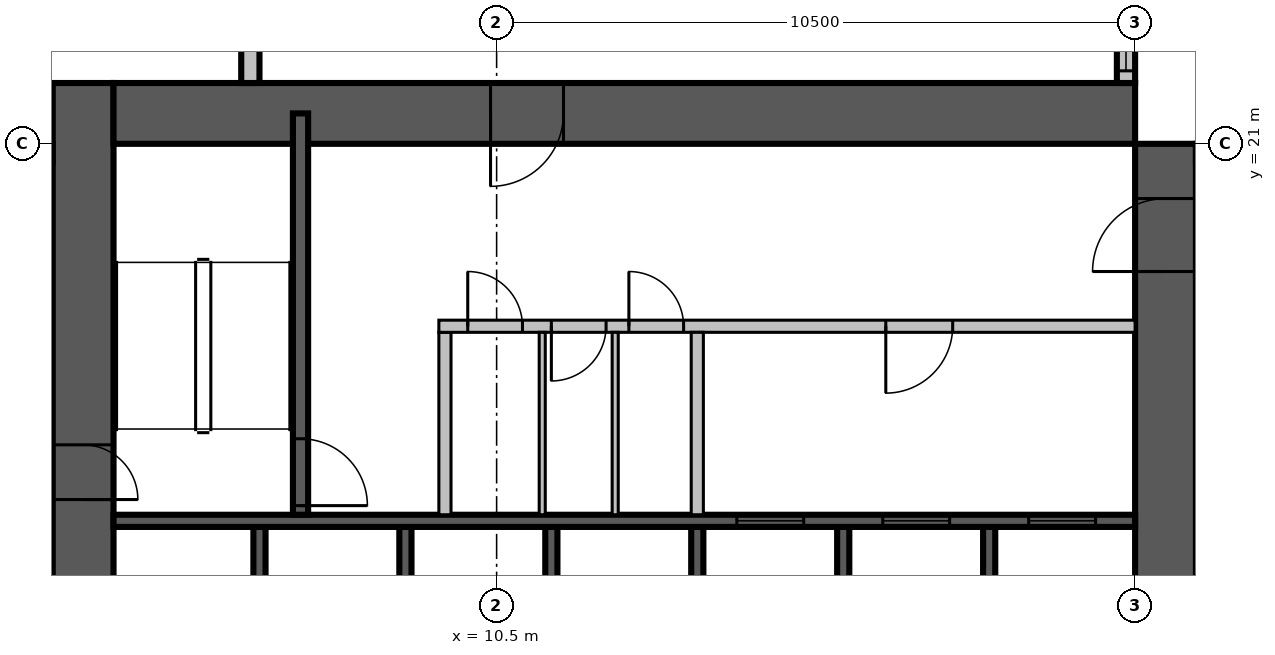
"""IFC4 building model, lengths in metres.
Left out: names, types, materials, properties, quantities, classifications, styles, units other than length and angle.
Written with IfcOpenShell. Run it as: python <this file> out.ifc"""

import sys

from ifc_helpers import new_model, si_unit, direction, frame, frame_2d, origin, place, context, subcontext, project, spatial, rectangle, extrude, source, transform, mapped, element, fill, save


model = new_model("IFC4")
c1 = context("Model", 3, precision=1e-05, world=origin(), true_north=direction((0.0, 1.0)))
c2 = subcontext(c1, "Body", "Model", "MODEL_VIEW")
j1 = project(units=[si_unit("LENGTHUNIT", "METRE"), si_unit("PLANEANGLEUNIT", "RADIAN")], contexts=[c1])
p1 = place(None, origin())
s1 = spatial("IfcSite", under=j1, at=p1, CompositionType="ELEMENT")
p2 = place(p1, origin())
s2 = spatial("IfcBuilding", under=s1, at=p2, CompositionType="ELEMENT")
p3 = place(p2, frame((0.0, 0.0, 137.1)))
s3 = spatial("IfcBuildingStorey", under=s2, at=p3, CompositionType="ELEMENT", Elevation=137.1)
m1 = source(origin(), c2, "Body", "SweptSolid", [
    extrude(rectangle(XDim=17.8, YDim=1.0, at=frame_2d((8.9, 0.0))), origin(), (0.0, 0.0, 1.0), 4.2),
])
p4 = place(p3, frame((3.7, 4.2, 0.0), z_axis=(0.0, 0.0, 1.0), x_axis=(0.0, 1.0, 0.0)))
e1 = element("IfcWall", 1, at=p4, inside=s3, PredefinedType="SHEAR", context=c2, shape_type="MappedRepresentation", body=[
    mapped(m1, transform((0.0, 0.0, 0.0), scale=1.0)),
])
m2 = source(origin(), c2, "Body", "SweptSolid", [
    extrude(rectangle(XDim=2.2, YDim=2.1, at=frame_2d((1.1, 1.05))), frame((0.0, 0.51, 0.0), z_axis=(0.0, -1.0, 0.0), x_axis=(1.0, 0.0, 0.0)), (0.0, 0.0, 1.0), 1.02),
])
p5 = place(p4, frame((4.2, 0.0, 0.0)))
e2 = element("IfcOpeningElement", 2, at=p5, cuts=e1, PredefinedType="OPENING", context=c2, shape_type="MappedRepresentation", body=[
    mapped(m2, transform((0.0, 0.0, 0.0), scale=1.0)),
])
m3 = source(origin(), c2, "Body", "SweptSolid", [
    extrude(rectangle(XDim=0.9, YDim=2.1, at=frame_2d((0.45, 1.05))), frame((0.0, 0.51, 0.0), z_axis=(0.0, -1.0, 0.0), x_axis=(1.0, 0.0, 0.0)), (0.0, 0.0, 1.0), 1.02),
])
p6 = place(p4, frame((10.95, 0.0, 0.0)))
e3 = element("IfcOpeningElement", 3, at=p6, cuts=e1, PredefinedType="OPENING", context=c2, shape_type="MappedRepresentation", body=[
    mapped(m3, transform((0.0, 0.0, 0.0), scale=1.0)),
])
m4 = source(origin(), c2, "Body", "SweptSolid", [
    extrude(rectangle(XDim=16.8, YDim=1.0, at=frame_2d((8.4, 0.0))), origin(), (0.0, 0.0, 1.0), 4.2),
])
p7 = place(p3, frame((21.5, 4.2, 0.0), z_axis=(0.0, 0.0, 1.0), x_axis=(0.0, 1.0, 0.0)))
e4 = element("IfcWall", 4, at=p7, inside=s3, PredefinedType="SHEAR", context=c2, shape_type="MappedRepresentation", body=[
    mapped(m4, transform((0.0, 0.0, 0.0), scale=1.0)),
])
p8 = place(p7, frame((4.2, 0.0, 0.0)))
e5 = element("IfcOpeningElement", 5, at=p8, cuts=e4, PredefinedType="OPENING", context=c2, shape_type="MappedRepresentation", body=[
    mapped(m2, transform((0.0, 0.0, 0.0), scale=1.0)),
])
m5 = source(origin(), c2, "Body", "SweptSolid", [
    extrude(rectangle(XDim=1.2, YDim=2.1, at=frame_2d((0.6, 1.05))), frame((0.0, 0.51, 0.0), z_axis=(0.0, -1.0, 0.0), x_axis=(1.0, 0.0, 0.0)), (0.0, 0.0, 1.0), 1.02),
])
p9 = place(p7, frame((14.7, 0.0, 0.0)))
e6 = element("IfcOpeningElement", 6, at=p9, cuts=e4, PredefinedType="OPENING", context=c2, shape_type="MappedRepresentation", body=[
    mapped(m5, transform((0.0, 0.0, 0.0), scale=1.0)),
])
p10 = place(p3, frame((4.2, 21.5, 0.0), z_axis=(0.0, 0.0, 1.0), x_axis=(1.0, 0.0, 0.0)))
e7 = element("IfcWall", 7, at=p10, inside=s3, PredefinedType="SHEAR", context=c2, shape_type="MappedRepresentation", body=[
    mapped(m4, transform((0.0, 0.0, 0.0), scale=1.0)),
])
p11 = place(p10, frame((6.2, 0.0, 0.0)))
e8 = element("IfcOpeningElement", 8, at=p11, cuts=e7, PredefinedType="OPENING", context=c2, shape_type="MappedRepresentation", body=[
    mapped(m5, transform((0.0, 0.0, 0.0), scale=1.0)),
])
m6 = source(origin(), c2, "Body", "SweptSolid", [
    extrude(rectangle(XDim=6.875, YDim=0.3, at=frame_2d((3.438, 0.0))), origin(), (0.0, 0.0, 1.0), 3.8),
])
p12 = place(p3, frame((20.85, 22.0, 0.0), z_axis=(0.0, 0.0, 1.0), x_axis=(0.0, 1.0, 0.0)))
e9 = element("IfcWall", 9, at=p12, inside=s3, PredefinedType="STANDARD", context=c2, shape_type="MappedRepresentation", body=[
    mapped(m6, transform((0.0, 0.0, 0.0), scale=1.0)),
])
m7 = source(origin(), c2, "Body", "SweptSolid", [
    extrude(rectangle(XDim=1.8, YDim=2.7, at=frame_2d((0.9, 1.35))), frame((0.0, 0.16, 0.0), z_axis=(0.0, -1.0, 0.0), x_axis=(1.0, 0.0, 0.0)), (0.0, 0.0, 1.0), 0.32),
])
p13 = place(p12, frame((0.2, 0.0, 0.6)))
e10 = element("IfcOpeningElement", 10, at=p13, cuts=e9, PredefinedType="OPENING", context=c2, shape_type="MappedRepresentation", body=[
    mapped(m7, transform((0.0, 0.0, 0.0), scale=1.0)),
])
p14 = place(p12, frame((4.537, 0.0, 0.6)))
e11 = element("IfcOpeningElement", 11, at=p14, cuts=e9, PredefinedType="OPENING", context=c2, shape_type="MappedRepresentation", body=[
    mapped(m7, transform((0.0, 0.0, 0.0), scale=1.0)),
])
m8 = source(origin(), c2, "Body", "SweptSolid", [
    extrude(rectangle(XDim=16.4, YDim=0.3, at=frame_2d((8.2, 0.0))), origin(), (0.0, 0.0, 1.0), 3.8),
])
p15 = place(p3, frame((6.45, 38.4, 0.0), z_axis=(0.0, 0.0, 1.0), x_axis=(0.0, -1.0, 0.0)))
e12 = element("IfcWall", 12, at=p15, inside=s3, PredefinedType="STANDARD", context=c2, shape_type="MappedRepresentation", body=[
    mapped(m8, transform((0.0, 0.0, 0.0), scale=1.0)),
])
p16 = place(p15, frame((1.15, 0.0, 0.6)))
e13 = element("IfcOpeningElement", 13, at=p16, cuts=e12, PredefinedType="OPENING", context=c2, shape_type="MappedRepresentation", body=[
    mapped(m7, transform((0.0, 0.0, 0.0), scale=1.0)),
])
p17 = place(p15, frame((9.438, 0.0, 0.6)))
e14 = element("IfcOpeningElement", 14, at=p17, cuts=e12, PredefinedType="OPENING", context=c2, shape_type="MappedRepresentation", body=[
    mapped(m7, transform((0.0, 0.0, 0.0), scale=1.0)),
])
m9 = source(origin(), c2, "Body", "SweptSolid", [
    extrude(rectangle(XDim=3.0, YDim=2.7, at=frame_2d((1.5, 1.35))), frame((0.0, 0.16, 0.0), z_axis=(0.0, -1.0, 0.0), x_axis=(1.0, 0.0, 0.0)), (0.0, 0.0, 1.0), 0.32),
])
p18 = place(p15, frame((12.7, 0.0, 0.6)))
e15 = element("IfcOpeningElement", 15, at=p18, cuts=e12, PredefinedType="OPENING", context=c2, shape_type="MappedRepresentation", body=[
    mapped(m9, transform((0.0, 0.0, 0.0), scale=1.0)),
])
m10 = source(origin(), c2, "Body", "SweptSolid", [
    extrude(rectangle(XDim=1.0, YDim=2.1, at=frame_2d((0.5, 1.05))), frame((0.0, 0.16, 0.0), z_axis=(0.0, -1.0, 0.0), x_axis=(1.0, 0.0, 0.0)), (0.0, 0.0, 1.0), 0.32),
])
p19 = place(p15, frame((5.45, 0.0, 0.0)))
e16 = element("IfcOpeningElement", 16, at=p19, cuts=e12, PredefinedType="OPENING", context=c2, shape_type="MappedRepresentation", body=[
    mapped(m10, transform((0.0, 0.0, 0.0), scale=1.0)),
])
m11 = source(origin(), c2, "Body", "SweptSolid", [
    extrude(rectangle(XDim=3.0, YDim=0.2, at=frame_2d((1.5, 0.0))), origin(), (0.0, 0.0, 1.0), 4.2),
])
for number, where, z_axis, x_axis in (
    (17, (6.6, 11.7, 0.0), (0.0, 0.0, 1.0), (0.0, 1.0, 0.0)),
    (18, (9.0, 11.7, 0.0), (0.0, 0.0, 1.0), (0.0, 1.0, 0.0)),
    (19, (11.4, 11.7, 0.0), (0.0, 0.0, 1.0), (0.0, 1.0, 0.0)),
    (20, (13.8, 11.7, 0.0), (0.0, 0.0, 1.0), (0.0, 1.0, 0.0)),
    (21, (16.2, 11.7, 0.0), (0.0, 0.0, 1.0), (0.0, 1.0, 0.0)),
    (22, (18.6, 11.7, 0.0), (0.0, 0.0, 1.0), (0.0, 1.0, 0.0)),
):
    element("IfcWall", number, at=place(p3, frame(where, z_axis=z_axis, x_axis=x_axis)), inside=s3, PredefinedType="SOLIDWALL", context=c2, shape_type="MappedRepresentation", body=[
        mapped(m11, transform((0.0, 0.0, 0.0), scale=1.0)),
    ])
m12 = source(origin(), c2, "Body", "SweptSolid", [
    extrude(rectangle(XDim=16.8, YDim=0.2, at=frame_2d((8.4, 0.0))), origin(), (0.0, 0.0, 1.0), 4.2),
])
p20 = place(p3, frame((4.2, 14.8, 0.0), z_axis=(0.0, 0.0, 1.0), x_axis=(1.0, 0.0, 0.0)))
e23 = element("IfcWall", 23, at=p20, inside=s3, PredefinedType="SOLIDWALL", context=c2, shape_type="MappedRepresentation", body=[
    mapped(m12, transform((0.0, 0.0, 0.0), scale=1.0)),
])
m13 = source(origin(), c2, "Body", "SweptSolid", [
    extrude(rectangle(XDim=1.1, YDim=2.1, at=frame_2d((0.55, 1.05))), frame((0.0, 0.11, 0.0), z_axis=(0.0, -1.0, 0.0), x_axis=(1.0, 0.0, 0.0)), (0.0, 0.0, 1.0), 0.22),
])
p21 = place(p20, frame((10.25, 0.0, 0.0)))
e24 = element("IfcOpeningElement", 24, at=p21, cuts=e23, PredefinedType="OPENING", context=c2, shape_type="MappedRepresentation", body=[
    mapped(m13, transform((0.0, 0.0, 0.0), scale=1.0)),
])
p22 = place(p20, frame((12.65, 0.0, 0.0)))
e25 = element("IfcOpeningElement", 25, at=p22, cuts=e23, PredefinedType="OPENING", context=c2, shape_type="MappedRepresentation", body=[
    mapped(m13, transform((0.0, 0.0, 0.0), scale=1.0)),
])
p23 = place(p20, frame((15.05, 0.0, 0.0)))
e26 = element("IfcOpeningElement", 26, at=p23, cuts=e23, PredefinedType="OPENING", context=c2, shape_type="MappedRepresentation", body=[
    mapped(m13, transform((0.0, 0.0, 0.0), scale=1.0)),
])
m14 = source(origin(), c2, "Body", "SweptSolid", [
    extrude(rectangle(XDim=6.6, YDim=0.25, at=frame_2d((3.3, 0.0))), origin(), (0.0, 0.0, 1.0), 3.8),
])
p24 = place(p3, frame((7.275, 14.9, 0.0), z_axis=(0.0, 0.0, 1.0), x_axis=(0.0, 1.0, 0.0)))
e27 = element("IfcWall", 27, at=p24, inside=s3, PredefinedType="SOLIDWALL", context=c2, shape_type="MappedRepresentation", body=[
    mapped(m14, transform((0.0, 0.0, 0.0), scale=1.0)),
])
m15 = source(origin(), c2, "Body", "SweptSolid", [
    extrude(rectangle(XDim=1.1, YDim=2.1, at=frame_2d((0.55, 1.05))), frame((0.0, 0.135, 0.0), z_axis=(0.0, -1.0, 0.0), x_axis=(1.0, 0.0, 0.0)), (0.0, 0.0, 1.0), 0.27),
])
p25 = place(p24, frame((0.15, 0.0, 0.0)))
e28 = element("IfcOpeningElement", 28, at=p25, cuts=e27, PredefinedType="OPENING", context=c2, shape_type="MappedRepresentation", body=[
    mapped(m15, transform((0.0, 0.0, 0.0), scale=1.0)),
])
m16 = source(origin(), c2, "Body", "SweptSolid", [
    extrude(rectangle(XDim=3.0, YDim=0.2, at=frame_2d((1.5, 0.0))), origin(), (0.0, 0.0, 1.0), 3.8),
])
p26 = place(p3, frame((9.65, 14.9, 0.0), z_axis=(0.0, 0.0, 1.0), x_axis=(0.0, 1.0, 0.0)))
e29 = element("IfcWall", 29, at=p26, inside=s3, PredefinedType="PARTITIONING", context=c2, shape_type="MappedRepresentation", body=[
    mapped(m16, transform((0.0, 0.0, 0.0), scale=1.0)),
])
m17 = source(origin(), c2, "Body", "SweptSolid", [
    extrude(rectangle(XDim=11.45, YDim=0.2, at=frame_2d((5.725, 0.0))), origin(), (0.0, 0.0, 1.0), 3.8),
])
p27 = place(p3, frame((9.55, 18.0, 0.0), z_axis=(0.0, 0.0, 1.0), x_axis=(1.0, 0.0, 0.0)))
e30 = element("IfcWall", 30, at=p27, inside=s3, PredefinedType="PARTITIONING", context=c2, shape_type="MappedRepresentation", body=[
    mapped(m17, transform((0.0, 0.0, 0.0), scale=1.0)),
])
m18 = source(origin(), c2, "Body", "SweptSolid", [
    extrude(rectangle(XDim=0.9, YDim=2.1, at=frame_2d((0.45, 1.05))), frame((0.0, 0.11, 0.0), z_axis=(0.0, -1.0, 0.0), x_axis=(1.0, 0.0, 0.0)), (0.0, 0.0, 1.0), 0.22),
])
p28 = place(p27, frame((0.475, 0.0, 0.0)))
e31 = element("IfcOpeningElement", 31, at=p28, cuts=e30, PredefinedType="OPENING", context=c2, shape_type="MappedRepresentation", body=[
    mapped(m18, transform((0.0, 0.0, 0.0), scale=1.0)),
])
p29 = place(p27, frame((1.85, 0.0, 0.0)))
e32 = element("IfcOpeningElement", 32, at=p29, cuts=e30, PredefinedType="OPENING", context=c2, shape_type="MappedRepresentation", body=[
    mapped(m18, transform((0.0, 0.0, 0.0), scale=1.0)),
])
p30 = place(p27, frame((3.125, 0.0, 0.0)))
e33 = element("IfcOpeningElement", 33, at=p30, cuts=e30, PredefinedType="OPENING", context=c2, shape_type="MappedRepresentation", body=[
    mapped(m18, transform((0.0, 0.0, 0.0), scale=1.0)),
])
p31 = place(p27, frame((7.35, 0.0, 0.0)))
e34 = element("IfcOpeningElement", 34, at=p31, cuts=e30, PredefinedType="OPENING", context=c2, shape_type="MappedRepresentation", body=[
    mapped(m13, transform((0.0, 0.0, 0.0), scale=1.0)),
])
p32 = place(p3, frame((13.8, 14.9, 0.0), z_axis=(0.0, 0.0, 1.0), x_axis=(0.0, 1.0, 0.0)))
e35 = element("IfcWall", 35, at=p32, inside=s3, PredefinedType="PARTITIONING", context=c2, shape_type="MappedRepresentation", body=[
    mapped(m16, transform((0.0, 0.0, 0.0), scale=1.0)),
])
m19 = source(origin(), c2, "Body", "SweptSolid", [
    extrude(rectangle(XDim=3.0, YDim=0.1, at=frame_2d((1.5, 0.0))), origin(), (0.0, 0.0, 1.0), 3.8),
])
for number, where, z_axis, x_axis in (
    (36, (11.25, 14.9, 0.0), (0.0, 0.0, 1.0), (0.0, 1.0, 0.0)),
    (37, (12.45, 14.9, 0.0), (0.0, 0.0, 1.0), (0.0, 1.0, 0.0)),
):
    element("IfcWall", number, at=place(p3, frame(where, z_axis=z_axis, x_axis=x_axis)), inside=s3, PredefinedType="PARTITIONING", context=c2, shape_type="MappedRepresentation", body=[
        mapped(m19, transform((0.0, 0.0, 0.0), scale=1.0)),
    ])
m20 = source(origin(), c2, "Body", "SweptSolid", [
    extrude(rectangle(XDim=1.8, YDim=2.7, at=frame_2d((0.9, 1.35))), frame((0.0, 0.03, 0.0), z_axis=(0.0, -1.0, 0.0), x_axis=(1.0, 0.0, 0.0)), (0.0, 0.0, 1.0), 0.06),
])
p33 = place(p13, origin())
e38 = element("IfcWindow", 38, at=p33, inside=s3, PartitioningType="SINGLE_PANEL", PredefinedType="WINDOW", context=c2, shape_type="MappedRepresentation", body=[
    mapped(m20, transform((0.0, 0.0, 0.0), scale=1.0)),
])
fill(e10, e38)
m21 = source(origin(), c2, "Body", "SweptSolid", [
    extrude(rectangle(XDim=1.1, YDim=2.1, at=frame_2d((0.55, 1.05))), frame((0.0, 0.025, 0.0), z_axis=(0.0, -1.0, 0.0), x_axis=(1.0, 0.0, 0.0)), (0.0, 0.0, 1.0), 0.05),
])
p34 = place(p21, origin())
e39 = element("IfcDoor", 39, at=p34, inside=s3, OperationType="SLIDING_TO_LEFT", PredefinedType="DOOR", context=c2, shape_type="MappedRepresentation", body=[
    mapped(m21, transform((0.0, 0.0, 0.0), scale=1.0)),
])
fill(e24, e39)
p35 = place(p22, origin())
e40 = element("IfcDoor", 40, at=p35, inside=s3, OperationType="SLIDING_TO_LEFT", PredefinedType="DOOR", context=c2, shape_type="MappedRepresentation", body=[
    mapped(m21, transform((0.0, 0.0, 0.0), scale=1.0)),
])
fill(e25, e40)
p36 = place(p23, origin())
e41 = element("IfcDoor", 41, at=p36, inside=s3, OperationType="SLIDING_TO_LEFT", PredefinedType="DOOR", context=c2, shape_type="MappedRepresentation", body=[
    mapped(m21, transform((0.0, 0.0, 0.0), scale=1.0)),
])
fill(e26, e41)
p37 = place(p25, origin())
e42 = element("IfcDoor", 42, at=p37, inside=s3, OperationType="SINGLE_SWING_RIGHT", PredefinedType="DOOR", context=c2, shape_type="MappedRepresentation", body=[
    mapped(m21, transform((0.0, 0.0, 0.0), scale=1.0)),
])
fill(e28, e42)
m22 = source(origin(), c2, "Body", "SweptSolid", [
    extrude(rectangle(XDim=0.9, YDim=2.1, at=frame_2d((0.45, 1.05))), frame((0.0, 0.025, 0.0), z_axis=(0.0, -1.0, 0.0), x_axis=(1.0, 0.0, 0.0)), (0.0, 0.0, 1.0), 0.05),
])
p38 = place(p28, origin())
e43 = element("IfcDoor", 43, at=p38, inside=s3, OperationType="SINGLE_SWING_LEFT", PredefinedType="DOOR", context=c2, shape_type="MappedRepresentation", body=[
    mapped(m22, transform((0.0, 0.0, 0.0), scale=1.0)),
])
fill(e31, e43)
p39 = place(p29, origin())
e44 = element("IfcDoor", 44, at=p39, inside=s3, OperationType="SINGLE_SWING_RIGHT", PredefinedType="DOOR", context=c2, shape_type="MappedRepresentation", body=[
    mapped(m22, transform((0.0, 0.0, 0.0), scale=1.0)),
])
fill(e32, e44)
p40 = place(p30, origin())
e45 = element("IfcDoor", 45, at=p40, inside=s3, OperationType="SINGLE_SWING_LEFT", PredefinedType="DOOR", context=c2, shape_type="MappedRepresentation", body=[
    mapped(m22, transform((0.0, 0.0, 0.0), scale=1.0)),
])
fill(e33, e45)
p41 = place(p31, origin())
e46 = element("IfcDoor", 46, at=p41, inside=s3, OperationType="SINGLE_SWING_RIGHT", PredefinedType="DOOR", context=c2, shape_type="MappedRepresentation", body=[
    mapped(m21, transform((0.0, 0.0, 0.0), scale=1.0)),
])
fill(e34, e46)
m23 = source(origin(), c2, "Body", "SweptSolid", [
    extrude(rectangle(XDim=1.2, YDim=2.1, at=frame_2d((0.6, 1.05))), frame((0.0, 0.025, 0.0), z_axis=(0.0, -1.0, 0.0), x_axis=(1.0, 0.0, 0.0)), (0.0, 0.0, 1.0), 0.05),
])
p42 = place(p11, origin())
e47 = element("IfcDoor", 47, at=p42, inside=s3, OperationType="SINGLE_SWING_RIGHT", PredefinedType="DOOR", context=c2, shape_type="MappedRepresentation", body=[
    mapped(m23, transform((0.0, 0.0, 0.0), scale=1.0)),
])
fill(e8, e47)
p43 = place(p9, origin())
e48 = element("IfcDoor", 48, at=p43, inside=s3, OperationType="SINGLE_SWING_LEFT", PredefinedType="DOOR", context=c2, shape_type="MappedRepresentation", body=[
    mapped(m23, transform((0.0, 0.0, 0.0), scale=1.0)),
])
fill(e6, e48)
p44 = place(p6, origin())
e49 = element("IfcDoor", 49, at=p44, inside=s3, OperationType="SINGLE_SWING_RIGHT", PredefinedType="DOOR", context=c2, shape_type="MappedRepresentation", body=[
    mapped(m22, transform((0.0, 0.0, 0.0), scale=1.0)),
])
fill(e3, e49)
save(model, sys.argv[1])
